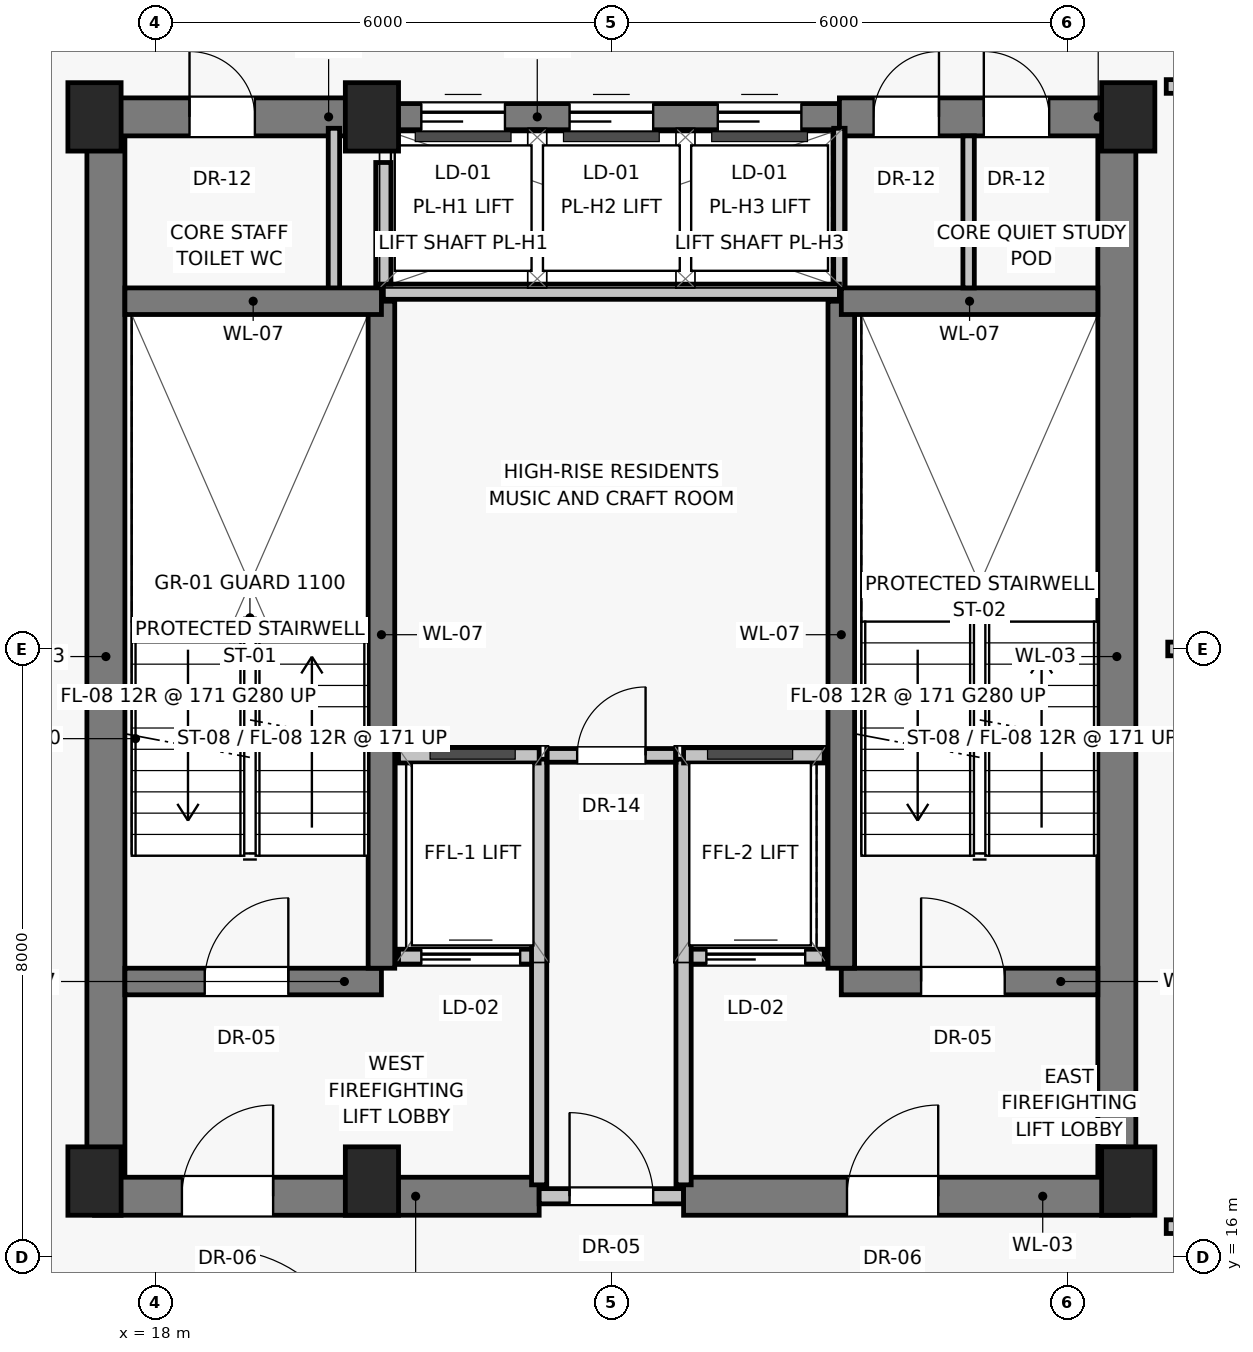
"""IFC4 building model, lengths in metres.
Left out: names, types, materials, properties, quantities, classifications, styles, units other than length and angle.
Written with IfcOpenShell. Run it as: python <this file> out.ifc"""

import sys

from ifc_helpers import new_model, si_unit, direction, frame, frame_2d, origin, origin_2d, place, context, subcontext, project, spatial, rectangle, extrude, source, transform, mapped, element, fill, save


model = new_model("IFC4")
c1 = context("Model", 3, precision=1e-05, world=origin(), true_north=direction((0.0, 1.0)))
c2 = subcontext(c1, "Body", "Model", "MODEL_VIEW")
j1 = project(units=[si_unit("LENGTHUNIT", "METRE"), si_unit("PLANEANGLEUNIT", "RADIAN")], contexts=[c1])
p1 = place(None, origin())
s1 = spatial("IfcSite", under=j1, at=p1, CompositionType="ELEMENT")
p2 = place(p1, origin())
s2 = spatial("IfcBuilding", under=s1, at=p2, CompositionType="ELEMENT")
p3 = place(p2, frame((0.0, 0.0, 240.65)))
s3 = spatial("IfcBuildingStorey", under=s2, at=p3, CompositionType="ELEMENT", Elevation=240.65)
for number, where, z_axis, x_axis in (
    (1, (17.2, 17.0, 0.0), (0.0, 0.0, 1.0), (1.0, 0.0, 0.0)),
    (2, (20.85, 17.0, 0.0), (0.0, 0.0, 1.0), (1.0, 0.0, 0.0)),
    (3, (30.8, 17.0, 0.0), (0.0, 0.0, 1.0), (1.0, 0.0, 0.0)),
    (4, (17.2, 31.0, 0.0), (0.0, 0.0, 1.0), (1.0, 0.0, 0.0)),
    (5, (20.85, 31.0, 0.0), (0.0, 0.0, 1.0), (1.0, 0.0, 0.0)),
    (6, (30.8, 31.0, 0.0), (0.0, 0.0, 1.0), (1.0, 0.0, 0.0)),
):
    element("IfcColumn", number, at=place(p3, frame(where, z_axis=z_axis, x_axis=x_axis)), inside=s3, PredefinedType="PILASTER", context=c2, shape_type="SweptSolid", body=[
        extrude(rectangle(XDim=0.7, YDim=0.9, at=origin_2d()), origin(), (0.0, 0.0, 1.0), 4.1),
    ])
for number, where, z_axis, x_axis in (
    (7, (17.35, 16.8, 0.0), (0.0, 0.0, 1.0), (0.0, 1.0, 0.0)),
    (8, (30.65, 16.8, 0.0), (0.0, 0.0, 1.0), (0.0, 1.0, 0.0)),
):
    element("IfcWall", number, at=place(p3, frame(where, z_axis=z_axis, x_axis=x_axis)), inside=s3, PredefinedType="SHEAR", context=c2, shape_type="SweptSolid", body=[
        extrude(rectangle(XDim=14.2, YDim=0.5, at=frame_2d((7.1, 0.0))), origin(), (0.0, 0.0, 1.0), 3.865),
    ])
p4 = place(p3, frame((17.2, 16.8, 0.0), z_axis=(0.0, 0.0, 1.0), x_axis=(1.0, 0.0, 0.0)))
e9 = element("IfcWall", 9, at=p4, inside=s3, PredefinedType="SHEAR", context=c2, shape_type="SweptSolid", body=[
    extrude(rectangle(XDim=5.85, YDim=0.5, at=frame_2d((2.925, 0.0))), origin(), (0.0, 0.0, 1.0), 3.865),
])
p5 = place(p4, frame((1.15, 0.0, 0.0)))
e10 = element("IfcOpeningElement", 10, at=p5, cuts=e9, PredefinedType="OPENING", context=c2, shape_type="SweptSolid", body=[
    extrude(rectangle(XDim=1.2, YDim=2.03, at=frame_2d((0.6, 1.015))), frame((0.0, 0.26, 0.0), z_axis=(0.0, -1.0, 0.0), x_axis=(1.0, 0.0, 0.0)), (0.0, 0.0, 1.0), 0.52),
])
p6 = place(p3, frame((23.05, 16.8, 0.0), z_axis=(0.0, 0.0, 1.0), x_axis=(1.0, 0.0, 0.0)))
e11 = element("IfcWall", 11, at=p6, inside=s3, PredefinedType="SOLIDWALL", context=c2, shape_type="SweptSolid", body=[
    extrude(rectangle(XDim=1.9, YDim=0.2, at=frame_2d((0.95, 0.0))), origin(), (0.0, 0.0, 1.0), 3.015),
])
p7 = place(p6, frame((0.4, 0.0, 0.0)))
e12 = element("IfcOpeningElement", 12, at=p7, cuts=e11, PredefinedType="OPENING", context=c2, shape_type="SweptSolid", body=[
    extrude(rectangle(XDim=1.1, YDim=2.03, at=frame_2d((0.55, 1.015))), frame((0.0, 0.11, 0.0), z_axis=(0.0, -1.0, 0.0), x_axis=(1.0, 0.0, 0.0)), (0.0, 0.0, 1.0), 0.22),
])
p8 = place(p3, frame((24.95, 16.8, 0.0), z_axis=(0.0, 0.0, 1.0), x_axis=(1.0, 0.0, 0.0)))
e13 = element("IfcWall", 13, at=p8, inside=s3, PredefinedType="SHEAR", context=c2, shape_type="SweptSolid", body=[
    extrude(rectangle(XDim=5.85, YDim=0.5, at=frame_2d((2.925, 0.0))), origin(), (0.0, 0.0, 1.0), 3.865),
])
p9 = place(p8, frame((2.15, 0.0, 0.0)))
e14 = element("IfcOpeningElement", 14, at=p9, cuts=e13, PredefinedType="OPENING", context=c2, shape_type="SweptSolid", body=[
    extrude(rectangle(XDim=1.2, YDim=2.03, at=frame_2d((0.6, 1.015))), frame((0.0, 0.26, 0.0), z_axis=(0.0, -1.0, 0.0), x_axis=(1.0, 0.0, 0.0)), (0.0, 0.0, 1.0), 0.52),
])
p10 = place(p3, frame((17.2, 31.0, 0.0), z_axis=(0.0, 0.0, 1.0), x_axis=(1.0, 0.0, 0.0)))
e15 = element("IfcWall", 15, at=p10, inside=s3, PredefinedType="SHEAR", context=c2, shape_type="SweptSolid", body=[
    extrude(rectangle(XDim=3.8, YDim=0.5, at=frame_2d((1.9, 0.0))), origin(), (0.0, 0.0, 1.0), 3.865),
])
p11 = place(p10, frame((1.25, 0.0, 0.0)))
e16 = element("IfcOpeningElement", 16, at=p11, cuts=e15, PredefinedType="OPENING", context=c2, shape_type="SweptSolid", body=[
    extrude(rectangle(XDim=0.86, YDim=2.01, at=frame_2d((0.43, 1.005))), frame((0.0, 0.26, 0.0), z_axis=(0.0, -1.0, 0.0), x_axis=(1.0, 0.0, 0.0)), (0.0, 0.0, 1.0), 0.52),
])
p12 = place(p3, frame((21.0, 31.0, 0.0), z_axis=(0.0, 0.0, 1.0), x_axis=(1.0, 0.0, 0.0)))
e17 = element("IfcWall", 17, at=p12, inside=s3, PredefinedType="SHEAR", context=c2, shape_type="SweptSolid", body=[
    extrude(rectangle(XDim=6.0, YDim=0.35, at=frame_2d((3.0, 0.0))), origin(), (0.0, 0.0, 1.0), 3.865),
])
p13 = place(p12, frame((0.5, 0.0, 0.0)))
e18 = element("IfcOpeningElement", 18, at=p13, cuts=e17, PredefinedType="OPENING", context=c2, shape_type="SweptSolid", body=[
    extrude(rectangle(XDim=1.1, YDim=2.08, at=frame_2d((0.55, 1.04))), frame((0.0, 0.185, 0.0), z_axis=(0.0, -1.0, 0.0), x_axis=(1.0, 0.0, 0.0)), (0.0, 0.0, 1.0), 0.37),
])
p14 = place(p12, frame((2.45, 0.0, 0.0)))
e19 = element("IfcOpeningElement", 19, at=p14, cuts=e17, PredefinedType="OPENING", context=c2, shape_type="SweptSolid", body=[
    extrude(rectangle(XDim=1.1, YDim=2.08, at=frame_2d((0.55, 1.04))), frame((0.0, 0.185, 0.0), z_axis=(0.0, -1.0, 0.0), x_axis=(1.0, 0.0, 0.0)), (0.0, 0.0, 1.0), 0.37),
])
p15 = place(p12, frame((4.4, 0.0, 0.0)))
e20 = element("IfcOpeningElement", 20, at=p15, cuts=e17, PredefinedType="OPENING", context=c2, shape_type="SweptSolid", body=[
    extrude(rectangle(XDim=1.1, YDim=2.08, at=frame_2d((0.55, 1.04))), frame((0.0, 0.185, 0.0), z_axis=(0.0, -1.0, 0.0), x_axis=(1.0, 0.0, 0.0)), (0.0, 0.0, 1.0), 0.37),
])
p16 = place(p3, frame((27.0, 31.0, 0.0), z_axis=(0.0, 0.0, 1.0), x_axis=(1.0, 0.0, 0.0)))
e21 = element("IfcWall", 21, at=p16, inside=s3, PredefinedType="SHEAR", context=c2, shape_type="SweptSolid", body=[
    extrude(rectangle(XDim=3.8, YDim=0.5, at=frame_2d((1.9, 0.0))), origin(), (0.0, 0.0, 1.0), 3.865),
])
p17 = place(p16, frame((0.45, 0.0, 0.0)))
e22 = element("IfcOpeningElement", 22, at=p17, cuts=e21, PredefinedType="OPENING", context=c2, shape_type="SweptSolid", body=[
    extrude(rectangle(XDim=0.86, YDim=2.01, at=frame_2d((0.43, 1.005))), frame((0.0, 0.26, 0.0), z_axis=(0.0, -1.0, 0.0), x_axis=(1.0, 0.0, 0.0)), (0.0, 0.0, 1.0), 0.52),
])
p18 = place(p16, frame((1.9, 0.0, 0.0)))
e23 = element("IfcOpeningElement", 23, at=p18, cuts=e21, PredefinedType="OPENING", context=c2, shape_type="SweptSolid", body=[
    extrude(rectangle(XDim=0.86, YDim=2.01, at=frame_2d((0.43, 1.005))), frame((0.0, 0.26, 0.0), z_axis=(0.0, -1.0, 0.0), x_axis=(1.0, 0.0, 0.0)), (0.0, 0.0, 1.0), 0.52),
])
for number, where, z_axis, x_axis in (
    (24, (20.35, 28.65, 0.0), (0.0, 0.0, 1.0), (0.0, 1.0, 0.0)),
    (25, (27.0, 28.65, 0.0), (0.0, 0.0, 1.0), (0.0, 1.0, 0.0)),
):
    element("IfcWall", number, at=place(p3, frame(where, z_axis=z_axis, x_axis=x_axis)), inside=s3, PredefinedType="PARTITIONING", context=c2, shape_type="SweptSolid", body=[
        extrude(rectangle(XDim=2.2, YDim=0.15, at=frame_2d((1.1, 0.0))), origin(), (0.0, 0.0, 1.0), 3.865),
    ])
p19 = place(p3, frame((17.6, 19.625, 0.0), z_axis=(0.0, 0.0, 1.0), x_axis=(1.0, 0.0, 0.0)))
e26 = element("IfcWall", 26, at=p19, inside=s3, PredefinedType="SHEAR", context=c2, shape_type="SweptSolid", body=[
    extrude(rectangle(XDim=3.375, YDim=0.35, at=frame_2d((1.688, 0.0))), origin(), (0.0, 0.0, 1.0), 3.865),
])
p20 = place(p19, frame((1.05, 0.0, 0.0)))
e27 = element("IfcOpeningElement", 27, at=p20, cuts=e26, PredefinedType="OPENING", context=c2, shape_type="SweptSolid", body=[
    extrude(rectangle(XDim=1.1, YDim=2.03, at=frame_2d((0.55, 1.015))), frame((0.0, 0.185, 0.0), z_axis=(0.0, -1.0, 0.0), x_axis=(1.0, 0.0, 0.0)), (0.0, 0.0, 1.0), 0.37),
])
p21 = place(p3, frame((21.2, 19.95, 0.0), z_axis=(0.0, 0.0, 1.0), x_axis=(1.0, 0.0, 0.0)))
e28 = element("IfcWall", 28, at=p21, inside=s3, PredefinedType="SOLIDWALL", context=c2, shape_type="SweptSolid", body=[
    extrude(rectangle(XDim=1.85, YDim=0.2, at=frame_2d((0.925, 0.0))), origin(), (0.0, 0.0, 1.0), 3.865),
])
p22 = place(p21, frame((0.3, 0.0, 0.0)))
e29 = element("IfcOpeningElement", 29, at=p22, cuts=e28, PredefinedType="OPENING", context=c2, shape_type="SweptSolid", body=[
    extrude(rectangle(XDim=1.3, YDim=2.25, at=frame_2d((0.65, 1.125))), frame((0.0, 0.11, 0.0), z_axis=(0.0, -1.0, 0.0), x_axis=(1.0, 0.0, 0.0)), (0.0, 0.0, 1.0), 0.22),
])
p23 = place(p3, frame((24.95, 19.95, 0.0), z_axis=(0.0, 0.0, 1.0), x_axis=(1.0, 0.0, 0.0)))
e30 = element("IfcWall", 30, at=p23, inside=s3, PredefinedType="SOLIDWALL", context=c2, shape_type="SweptSolid", body=[
    extrude(rectangle(XDim=1.85, YDim=0.2, at=frame_2d((0.925, 0.0))), origin(), (0.0, 0.0, 1.0), 3.865),
])
p24 = place(p23, frame((0.3, 0.0, 0.0)))
e31 = element("IfcOpeningElement", 31, at=p24, cuts=e30, PredefinedType="OPENING", context=c2, shape_type="SweptSolid", body=[
    extrude(rectangle(XDim=1.3, YDim=2.25, at=frame_2d((0.65, 1.125))), frame((0.0, 0.11, 0.0), z_axis=(0.0, -1.0, 0.0), x_axis=(1.0, 0.0, 0.0)), (0.0, 0.0, 1.0), 0.22),
])
p25 = place(p3, frame((27.025, 19.625, 0.0), z_axis=(0.0, 0.0, 1.0), x_axis=(1.0, 0.0, 0.0)))
e32 = element("IfcWall", 32, at=p25, inside=s3, PredefinedType="SHEAR", context=c2, shape_type="SweptSolid", body=[
    extrude(rectangle(XDim=3.375, YDim=0.35, at=frame_2d((1.688, 0.0))), origin(), (0.0, 0.0, 1.0), 3.865),
])
p26 = place(p25, frame((1.05, 0.0, 0.0)))
e33 = element("IfcOpeningElement", 33, at=p26, cuts=e32, PredefinedType="OPENING", context=c2, shape_type="SweptSolid", body=[
    extrude(rectangle(XDim=1.1, YDim=2.03, at=frame_2d((0.55, 1.015))), frame((0.0, 0.185, 0.0), z_axis=(0.0, -1.0, 0.0), x_axis=(1.0, 0.0, 0.0)), (0.0, 0.0, 1.0), 0.37),
])
for number, where, z_axis, x_axis in (
    (34, (20.975, 19.8, 0.0), (0.0, 0.0, 1.0), (0.0, 1.0, 0.0)),
    (35, (27.025, 19.8, 0.0), (0.0, 0.0, 1.0), (0.0, 1.0, 0.0)),
):
    element("IfcWall", number, at=place(p3, frame(where, z_axis=z_axis, x_axis=x_axis)), inside=s3, PredefinedType="SHEAR", context=c2, shape_type="SweptSolid", body=[
        extrude(rectangle(XDim=8.775, YDim=0.35, at=frame_2d((4.387, 0.0))), origin(), (0.0, 0.0, 1.0), 3.865),
    ])
for number, where, z_axis, x_axis in (
    (36, (17.6, 28.575, 0.0), (0.0, 0.0, 1.0), (1.0, 0.0, 0.0)),
    (37, (27.025, 28.575, 0.0), (0.0, 0.0, 1.0), (1.0, 0.0, 0.0)),
):
    element("IfcWall", number, at=place(p3, frame(where, z_axis=z_axis, x_axis=x_axis)), inside=s3, PredefinedType="SHEAR", context=c2, shape_type="SweptSolid", body=[
        extrude(rectangle(XDim=3.375, YDim=0.35, at=frame_2d((1.688, 0.0))), origin(), (0.0, 0.0, 1.0), 3.865),
    ])
for number, where, z_axis, x_axis in (
    (38, (23.05, 16.95, 0.0), (0.0, 0.0, 1.0), (0.0, 1.0, 0.0)),
    (39, (24.95, 16.95, 0.0), (0.0, 0.0, 1.0), (0.0, 1.0, 0.0)),
):
    element("IfcWall", number, at=place(p3, frame(where, z_axis=z_axis, x_axis=x_axis)), inside=s3, PredefinedType="SOLIDWALL", context=c2, shape_type="SweptSolid", body=[
        extrude(rectangle(XDim=5.6, YDim=0.2, at=frame_2d((2.8, 0.0))), origin(), (0.0, 0.0, 1.0), 3.865),
    ])
for number, where, z_axis, x_axis in (
    (40, (21.2, 22.6, 0.0), (0.0, 0.0, 1.0), (1.0, 0.0, 0.0)),
    (41, (24.95, 22.6, 0.0), (0.0, 0.0, 1.0), (1.0, 0.0, 0.0)),
):
    element("IfcWall", number, at=place(p3, frame(where, z_axis=z_axis, x_axis=x_axis)), inside=s3, PredefinedType="SOLIDWALL", context=c2, shape_type="SweptSolid", body=[
        extrude(rectangle(XDim=1.85, YDim=0.2, at=frame_2d((0.925, 0.0))), origin(), (0.0, 0.0, 1.0), 3.865),
    ])
p27 = place(p3, frame((21.0, 28.7, 0.0), z_axis=(0.0, 0.0, 1.0), x_axis=(1.0, 0.0, 0.0)))
e42 = element("IfcWall", 42, at=p27, inside=s3, PredefinedType="SOLIDWALL", context=c2, shape_type="SweptSolid", body=[
    extrude(rectangle(XDim=6.0, YDim=0.2, at=frame_2d((3.0, 0.0))), origin(), (0.0, 0.0, 1.0), 3.865),
])
p28 = place(p3, frame((21.0, 28.8, 0.0), z_axis=(0.0, 0.0, 1.0), x_axis=(0.0, 1.0, 0.0)))
e43 = element("IfcWall", 43, at=p28, inside=s3, PredefinedType="SOLIDWALL", context=c2, shape_type="SweptSolid", body=[
    extrude(rectangle(XDim=1.6, YDim=0.2, at=frame_2d((0.8, 0.0))), origin(), (0.0, 0.0, 1.0), 3.865),
])
p29 = place(p3, frame((23.15, 22.6, 0.0), z_axis=(0.0, 0.0, 1.0), x_axis=(1.0, 0.0, 0.0)))
e44 = element("IfcWall", 44, at=p29, inside=s3, PredefinedType="PARTITIONING", context=c2, shape_type="SweptSolid", body=[
    extrude(rectangle(XDim=1.7, YDim=0.18, at=frame_2d((0.85, 0.0))), origin(), (0.0, 0.0, 1.0), 3.865),
])
p30 = place(p29, frame((0.4, 0.0, 0.0)))
e45 = element("IfcOpeningElement", 45, at=p30, cuts=e44, PredefinedType="OPENING", context=c2, shape_type="SweptSolid", body=[
    extrude(rectangle(XDim=0.9, YDim=2.01, at=frame_2d((0.45, 1.005))), frame((0.0, 0.1, 0.0), z_axis=(0.0, -1.0, 0.0), x_axis=(1.0, 0.0, 0.0)), (0.0, 0.0, 1.0), 0.2),
])
p31 = place(p3, frame((28.7, 28.75, 0.0), z_axis=(0.0, 0.0, 1.0), x_axis=(0.0, 1.0, 0.0)))
e46 = element("IfcWall", 46, at=p31, inside=s3, PredefinedType="PARTITIONING", context=c2, shape_type="SweptSolid", body=[
    extrude(rectangle(XDim=2.0, YDim=0.15, at=frame_2d((1.0, 0.0))), origin(), (0.0, 0.0, 1.0), 3.865),
])
p32 = place(p3, frame((31.32, 24.0, 0.0), z_axis=(0.0, 0.0, 1.0), x_axis=(1.0, 0.0, 0.0)))
e47 = element("IfcWall", 47, at=p32, inside=s3, PredefinedType="PARTITIONING", context=c2, shape_type="SweptSolid", body=[
    extrude(rectangle(XDim=9.39, YDim=0.18, at=frame_2d((4.695, 0.0))), origin(), (0.0, 0.0, 1.0), 3.865),
])
p33 = place(p3, frame((31.3, 16.4, 0.0), z_axis=(0.0, 0.0, 1.0), x_axis=(1.0, 0.0, 0.0)))
e48 = element("IfcWall", 48, at=p33, inside=s3, PredefinedType="PARTITIONING", context=c2, shape_type="SweptSolid", body=[
    extrude(rectangle(XDim=1.92, YDim=0.18, at=frame_2d((0.96, 0.0))), origin(), (0.0, 0.0, 1.0), 3.865),
])
p34 = place(p33, frame((0.72, 0.0, 0.0)))
e49 = element("IfcOpeningElement", 49, at=p34, cuts=e48, PredefinedType="OPENING", context=c2, shape_type="SweptSolid", body=[
    extrude(rectangle(XDim=1.0, YDim=2.01, at=frame_2d((0.5, 1.005))), frame((0.0, 0.1, 0.0), z_axis=(0.0, -1.0, 0.0), x_axis=(1.0, 0.0, 0.0)), (0.0, 0.0, 1.0), 0.2),
])
p35 = place(p3, frame((31.3, 31.4, 0.0), z_axis=(0.0, 0.0, 1.0), x_axis=(1.0, 0.0, 0.0)))
e50 = element("IfcWall", 50, at=p35, inside=s3, PredefinedType="PARTITIONING", context=c2, shape_type="SweptSolid", body=[
    extrude(rectangle(XDim=1.92, YDim=0.18, at=frame_2d((0.96, 0.0))), origin(), (0.0, 0.0, 1.0), 3.865),
])
p36 = place(p35, frame((0.72, 0.0, 0.0)))
e51 = element("IfcOpeningElement", 51, at=p36, cuts=e50, PredefinedType="OPENING", context=c2, shape_type="SweptSolid", body=[
    extrude(rectangle(XDim=1.0, YDim=2.01, at=frame_2d((0.5, 1.005))), frame((0.0, 0.1, 0.0), z_axis=(0.0, -1.0, 0.0), x_axis=(1.0, 0.0, 0.0)), (0.0, 0.0, 1.0), 0.2),
])
m1 = source(origin(), c2, "Body", "SweptSolid", [
    extrude(rectangle(XDim=1.2, YDim=2.03, at=frame_2d((0.6, 1.015))), frame((0.0, 0.025, 0.0), z_axis=(0.0, -1.0, 0.0), x_axis=(1.0, 0.0, 0.0)), (0.0, 0.0, 1.0), 0.05),
])
p37 = place(p5, origin())
e52 = element("IfcDoor", 52, at=p37, inside=s3, OperationType="SINGLE_SWING_RIGHT", PredefinedType="DOOR", context=c2, shape_type="MappedRepresentation", body=[
    mapped(m1, transform((0.0, 0.0, 0.0), scale=1.0)),
])
fill(e10, e52)
m2 = source(origin(), c2, "Body", "SweptSolid", [
    extrude(rectangle(XDim=1.1, YDim=2.03, at=frame_2d((0.55, 1.015))), frame((0.0, 0.025, 0.0), z_axis=(0.0, -1.0, 0.0), x_axis=(1.0, 0.0, 0.0)), (0.0, 0.0, 1.0), 0.05),
])
p38 = place(p7, origin())
e53 = element("IfcDoor", 53, at=p38, inside=s3, OperationType="SINGLE_SWING_LEFT", PredefinedType="DOOR", context=c2, shape_type="MappedRepresentation", body=[
    mapped(m2, transform((0.0, 0.0, 0.0), scale=1.0)),
])
fill(e12, e53)
p39 = place(p9, origin())
e54 = element("IfcDoor", 54, at=p39, inside=s3, OperationType="SINGLE_SWING_RIGHT", PredefinedType="DOOR", context=c2, shape_type="MappedRepresentation", body=[
    mapped(m1, transform((0.0, 0.0, 0.0), scale=1.0)),
])
fill(e14, e54)
m3 = source(origin(), c2, "Body", "SweptSolid", [
    extrude(rectangle(XDim=0.86, YDim=2.01, at=frame_2d((0.43, 1.005))), frame((0.0, 0.025, 0.0), z_axis=(0.0, -1.0, 0.0), x_axis=(1.0, 0.0, 0.0)), (0.0, 0.0, 1.0), 0.05),
])
p40 = place(p11, origin())
e55 = element("IfcDoor", 55, at=p40, inside=s3, OperationType="SINGLE_SWING_LEFT", PredefinedType="DOOR", context=c2, shape_type="MappedRepresentation", body=[
    mapped(m3, transform((0.0, 0.0, 0.0), scale=1.0)),
])
fill(e16, e55)
m4 = source(origin(), c2, "Body", "SweptSolid", [
    extrude(rectangle(XDim=1.1, YDim=2.08, at=frame_2d((0.55, 1.04))), frame((0.0, 0.025, 0.0), z_axis=(0.0, -1.0, 0.0), x_axis=(1.0, 0.0, 0.0)), (0.0, 0.0, 1.0), 0.05),
])
p41 = place(p13, origin())
e56 = element("IfcDoor", 56, at=p41, inside=s3, OperationType="SLIDING_TO_LEFT", PredefinedType="DOOR", context=c2, shape_type="MappedRepresentation", body=[
    mapped(m4, transform((0.0, 0.0, 0.0), scale=1.0)),
])
fill(e18, e56)
p42 = place(p14, origin())
e57 = element("IfcDoor", 57, at=p42, inside=s3, OperationType="SLIDING_TO_LEFT", PredefinedType="DOOR", context=c2, shape_type="MappedRepresentation", body=[
    mapped(m4, transform((0.0, 0.0, 0.0), scale=1.0)),
])
fill(e19, e57)
p43 = place(p15, origin())
e58 = element("IfcDoor", 58, at=p43, inside=s3, OperationType="SLIDING_TO_LEFT", PredefinedType="DOOR", context=c2, shape_type="MappedRepresentation", body=[
    mapped(m4, transform((0.0, 0.0, 0.0), scale=1.0)),
])
fill(e20, e58)
p44 = place(p17, origin())
e59 = element("IfcDoor", 59, at=p44, inside=s3, OperationType="SINGLE_SWING_RIGHT", PredefinedType="DOOR", context=c2, shape_type="MappedRepresentation", body=[
    mapped(m3, transform((0.0, 0.0, 0.0), scale=1.0)),
])
fill(e22, e59)
p45 = place(p18, origin())
e60 = element("IfcDoor", 60, at=p45, inside=s3, OperationType="SINGLE_SWING_LEFT", PredefinedType="DOOR", context=c2, shape_type="MappedRepresentation", body=[
    mapped(m3, transform((0.0, 0.0, 0.0), scale=1.0)),
])
fill(e23, e60)
p46 = place(p20, origin())
e61 = element("IfcDoor", 61, at=p46, inside=s3, OperationType="SINGLE_SWING_RIGHT", PredefinedType="DOOR", context=c2, shape_type="MappedRepresentation", body=[
    mapped(m2, transform((0.0, 0.0, 0.0), scale=1.0)),
])
fill(e27, e61)
m5 = source(origin(), c2, "Body", "SweptSolid", [
    extrude(rectangle(XDim=1.3, YDim=2.25, at=frame_2d((0.65, 1.125))), frame((0.0, 0.025, 0.0), z_axis=(0.0, -1.0, 0.0), x_axis=(1.0, 0.0, 0.0)), (0.0, 0.0, 1.0), 0.05),
])
p47 = place(p22, origin())
e62 = element("IfcDoor", 62, at=p47, inside=s3, OperationType="SLIDING_TO_LEFT", PredefinedType="DOOR", context=c2, shape_type="MappedRepresentation", body=[
    mapped(m5, transform((0.0, 0.0, 0.0), scale=1.0)),
])
fill(e29, e62)
p48 = place(p24, origin())
e63 = element("IfcDoor", 63, at=p48, inside=s3, OperationType="SLIDING_TO_LEFT", PredefinedType="DOOR", context=c2, shape_type="MappedRepresentation", body=[
    mapped(m5, transform((0.0, 0.0, 0.0), scale=1.0)),
])
fill(e31, e63)
p49 = place(p26, origin())
e64 = element("IfcDoor", 64, at=p49, inside=s3, OperationType="SINGLE_SWING_LEFT", PredefinedType="DOOR", context=c2, shape_type="MappedRepresentation", body=[
    mapped(m2, transform((0.0, 0.0, 0.0), scale=1.0)),
])
fill(e33, e64)
m6 = source(origin(), c2, "Body", "SweptSolid", [
    extrude(rectangle(XDim=0.9, YDim=2.01, at=frame_2d((0.45, 1.005))), frame((0.0, 0.025, 0.0), z_axis=(0.0, -1.0, 0.0), x_axis=(1.0, 0.0, 0.0)), (0.0, 0.0, 1.0), 0.05),
])
p50 = place(p30, origin())
e65 = element("IfcDoor", 65, at=p50, inside=s3, OperationType="SINGLE_SWING_RIGHT", PredefinedType="DOOR", context=c2, shape_type="MappedRepresentation", body=[
    mapped(m6, transform((0.0, 0.0, 0.0), scale=1.0)),
])
fill(e45, e65)
save(model, sys.argv[1])
